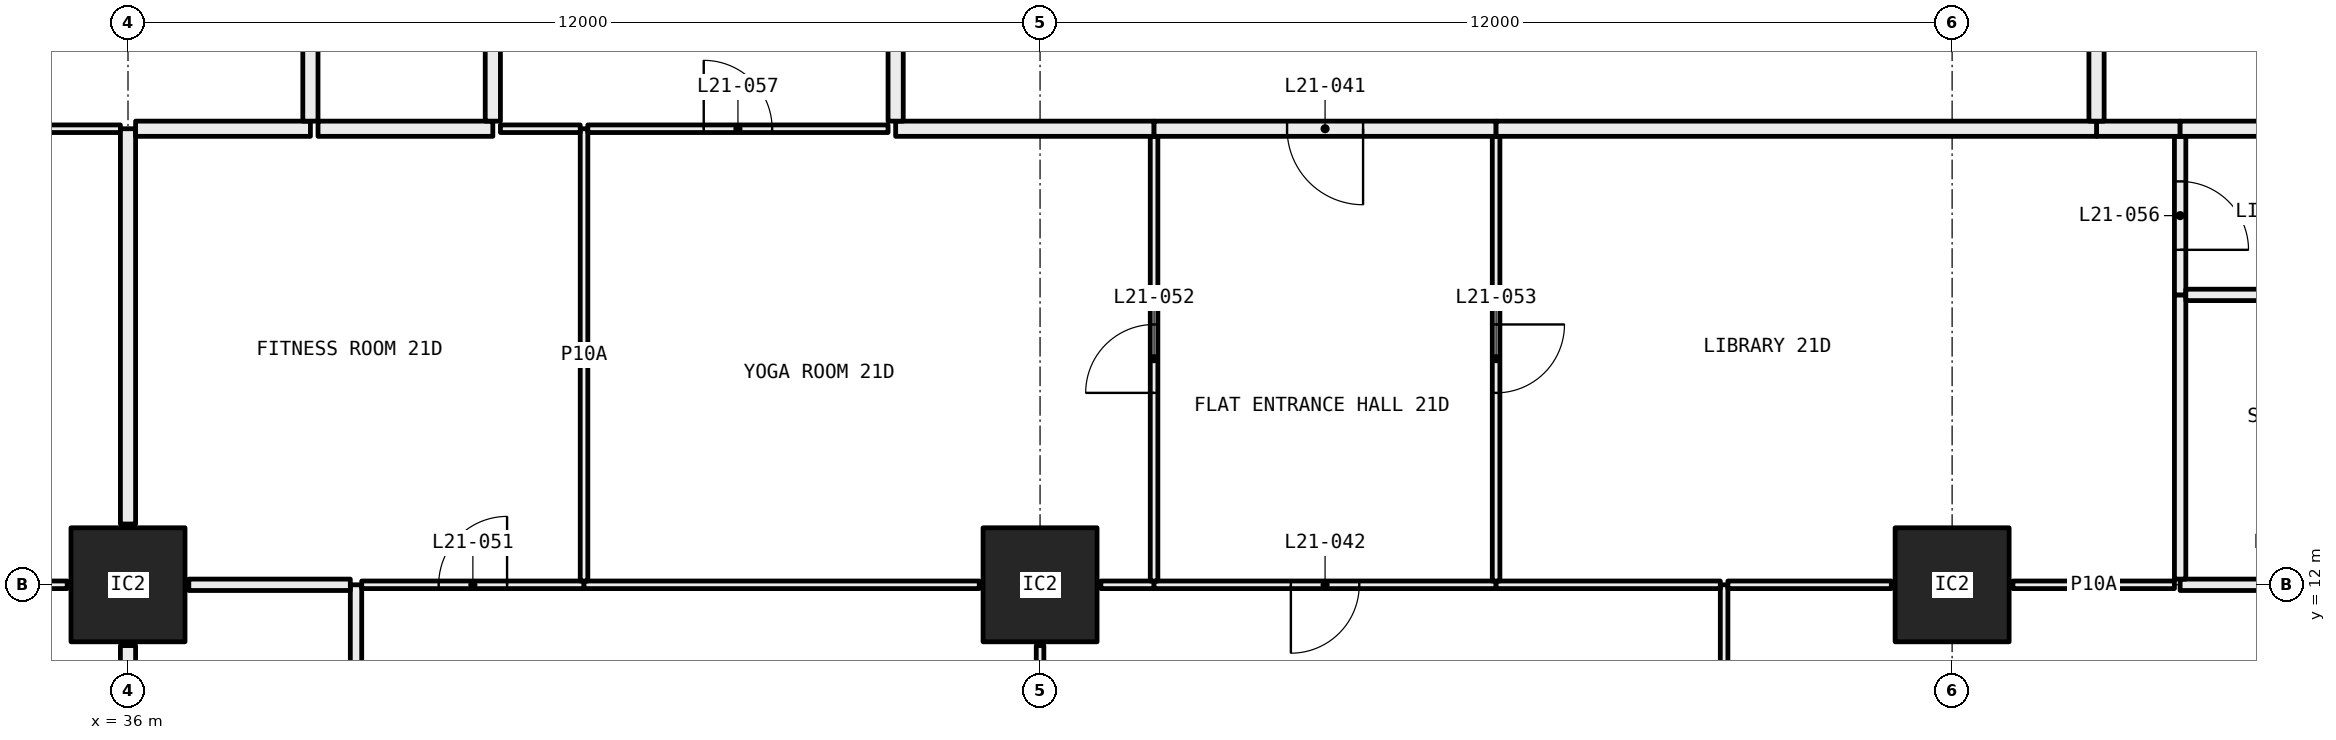
"""IFC4 building model, lengths in metres.
Left out: names, types, materials, properties, quantities, classifications, styles, units other than length and angle.
Written with IfcOpenShell. Run it as: python <this file> out.ifc"""

import sys

from ifc_helpers import new_model, si_unit, direction, frame, frame_2d, origin, origin_2d, place, context, subcontext, project, spatial, rectangle, hollow_rectangle, extrude, element, fill, save


model = new_model("IFC4")
c1 = context("Model", 3, precision=1e-05, world=origin(), true_north=direction((0.0, 1.0)))
c2 = subcontext(c1, "Body", "Model", "MODEL_VIEW")
j1 = project(units=[si_unit("LENGTHUNIT", "METRE"), si_unit("PLANEANGLEUNIT", "RADIAN")], contexts=[c1])
p1 = place(None, origin())
s1 = spatial("IfcSite", under=j1, at=p1, CompositionType="ELEMENT")
p2 = place(p1, origin())
s2 = spatial("IfcBuilding", under=s1, at=p2, CompositionType="ELEMENT")
p3 = place(p2, frame((0.0, 0.0, 85.2)))
s3 = spatial("IfcBuildingStorey", under=s2, at=p3, CompositionType="ELEMENT", Elevation=85.2)
for number, where, z_axis, x_axis in (
    (1, (36.0, 12.0, 0.0), (0.0, 0.0, 1.0), (1.0, 0.0, 0.0)),
    (2, (48.0, 12.0, 0.0), (0.0, 0.0, 1.0), (1.0, 0.0, 0.0)),
    (3, (60.0, 12.0, 0.0), (0.0, 0.0, 1.0), (1.0, 0.0, 0.0)),
):
    element("IfcColumn", number, at=place(p3, frame(where, z_axis=z_axis, x_axis=x_axis)), inside=s3, PredefinedType="COLUMN", context=c2, shape_type="SweptSolid", body=[
        extrude(hollow_rectangle(XDim=1.5, YDim=1.5, WallThickness=0.065, at=origin_2d()), origin(), (0.0, 0.0, 1.0), 3.05),
    ])
p4 = place(p3, frame((35.2, 12.0, 0.0), z_axis=(0.0, 0.0, 1.0), x_axis=(-1.0, 0.0, 0.0)))
e4 = element("IfcWall", 4, at=p4, inside=s3, PredefinedType="PARTITIONING", context=c2, shape_type="SweptSolid", body=[
    extrude(rectangle(XDim=2.15, YDim=0.1, at=frame_2d((1.075, 0.0))), origin(), (0.0, 0.0, 1.0), 2.45),
])
p5 = place(p3, frame((36.0, 6.0, 0.0), z_axis=(0.0, 0.0, 1.0), x_axis=(0.0, 1.0, 0.0)))
e5 = element("IfcWall", 5, at=p5, inside=s3, PredefinedType="PARTITIONING", context=c2, shape_type="SweptSolid", body=[
    extrude(rectangle(XDim=5.2, YDim=0.2, at=frame_2d((2.6, 0.0))), origin(), (0.0, 0.0, 1.0), 2.45),
])
p6 = place(p3, frame((35.9, 18.0, 0.0), z_axis=(0.0, 0.0, 1.0), x_axis=(-1.0, 0.0, 0.0)))
e6 = element("IfcWall", 6, at=p6, inside=s3, PredefinedType="PARTITIONING", context=c2, shape_type="SweptSolid", body=[
    extrude(rectangle(XDim=1.4, YDim=0.1, at=frame_2d((0.7, 0.0))), origin(), (0.0, 0.0, 1.0), 3.05),
])
p7 = place(p3, frame((36.0, 12.8, 0.0), z_axis=(0.0, 0.0, 1.0), x_axis=(0.0, 1.0, 0.0)))
e7 = element("IfcWall", 7, at=p7, inside=s3, PredefinedType="PARTITIONING", context=c2, shape_type="SweptSolid", body=[
    extrude(rectangle(XDim=5.2, YDim=0.2, at=frame_2d((2.6, 0.0))), origin(), (0.0, 0.0, 1.0), 2.45),
])
p8 = place(p3, frame((36.1, 18.0, 0.0), z_axis=(0.0, 0.0, 1.0), x_axis=(1.0, 0.0, 0.0)))
e8 = element("IfcWall", 8, at=p8, inside=s3, PredefinedType="PARTITIONING", context=c2, shape_type="SweptSolid", body=[
    extrude(rectangle(XDim=2.3, YDim=0.2, at=frame_2d((1.15, 0.0))), origin(), (0.0, 0.0, 1.0), 3.05),
])
p9 = place(p3, frame((38.4, 18.1, 0.0), z_axis=(0.0, 0.0, 1.0), x_axis=(0.0, 1.0, 0.0)))
e9 = element("IfcWall", 9, at=p9, inside=s3, PredefinedType="PARTITIONING", context=c2, shape_type="SweptSolid", body=[
    extrude(rectangle(XDim=6.2, YDim=0.2, at=frame_2d((3.1, 0.0))), origin(), (0.0, 0.0, 1.0), 2.45),
])
p10 = place(p3, frame((39.0, 6.075, 0.0), z_axis=(0.0, 0.0, 1.0), x_axis=(0.0, 1.0, 0.0)))
e10 = element("IfcWall", 10, at=p10, inside=s3, PredefinedType="PARTITIONING", context=c2, shape_type="SweptSolid", body=[
    extrude(rectangle(XDim=5.925, YDim=0.15, at=frame_2d((2.962, 0.0))), origin(), (0.0, 0.0, 1.0), 2.45),
])
p11 = place(p10, frame((2.512, 0.0, 0.0)))
e11 = element("IfcOpeningElement", 11, at=p11, cuts=e10, PredefinedType="OPENING", context=c2, shape_type="SweptSolid", body=[
    extrude(rectangle(XDim=0.9, YDim=2.1, at=frame_2d((0.45, 1.05))), frame((0.0, 0.085, 0.0), z_axis=(0.0, -1.0, 0.0), x_axis=(1.0, 0.0, 0.0)), (0.0, 0.0, 1.0), 0.17),
])
p12 = place(p3, frame((38.925, 12.0, 0.0), z_axis=(0.0, 0.0, 1.0), x_axis=(-1.0, 0.0, 0.0)))
e12 = element("IfcWall", 12, at=p12, inside=s3, PredefinedType="PARTITIONING", context=c2, shape_type="SweptSolid", body=[
    extrude(rectangle(XDim=2.125, YDim=0.15, at=frame_2d((1.062, 0.0))), origin(), (0.0, 0.0, 1.0), 2.45),
])
p13 = place(p3, frame((48.0, 6.05, 0.0), z_axis=(0.0, 0.0, 1.0), x_axis=(0.0, 1.0, 0.0)))
e13 = element("IfcWall", 13, at=p13, inside=s3, PredefinedType="PARTITIONING", context=c2, shape_type="SweptSolid", body=[
    extrude(rectangle(XDim=5.15, YDim=0.1, at=frame_2d((2.575, 0.0))), origin(), (0.0, 0.0, 1.0), 2.45),
])
p14 = place(p13, frame((2.125, 0.0, 0.0)))
e14 = element("IfcOpeningElement", 14, at=p14, cuts=e13, PredefinedType="OPENING", context=c2, shape_type="SweptSolid", body=[
    extrude(rectangle(XDim=0.9, YDim=2.1, at=frame_2d((0.45, 1.05))), frame((0.0, 0.06, 0.0), z_axis=(0.0, -1.0, 0.0), x_axis=(1.0, 0.0, 0.0)), (0.0, 0.0, 1.0), 0.12),
])
p15 = place(p3, frame((42.0, 12.0, 0.0), z_axis=(0.0, 0.0, 1.0), x_axis=(-1.0, 0.0, 0.0)))
e15 = element("IfcWall", 15, at=p15, inside=s3, PredefinedType="PARTITIONING", context=c2, shape_type="SweptSolid", body=[
    extrude(rectangle(XDim=2.925, YDim=0.1, at=frame_2d((1.462, 0.0))), origin(), (0.0, 0.0, 1.0), 2.45),
])
p16 = place(p15, frame((1.012, 0.0, 0.0)))
e16 = element("IfcOpeningElement", 16, at=p16, cuts=e15, PredefinedType="OPENING", context=c2, shape_type="SweptSolid", body=[
    extrude(rectangle(XDim=0.9, YDim=2.1, at=frame_2d((0.45, 1.05))), frame((0.0, 0.06, 0.0), z_axis=(0.0, -1.0, 0.0), x_axis=(1.0, 0.0, 0.0)), (0.0, 0.0, 1.0), 0.12),
])
p17 = place(p3, frame((47.2, 12.0, 0.0), z_axis=(0.0, 0.0, 1.0), x_axis=(-1.0, 0.0, 0.0)))
e17 = element("IfcWall", 17, at=p17, inside=s3, PredefinedType="PARTITIONING", context=c2, shape_type="SweptSolid", body=[
    extrude(rectangle(XDim=5.2, YDim=0.1, at=frame_2d((2.6, 0.0))), origin(), (0.0, 0.0, 1.0), 2.45),
])
p18 = place(p3, frame((57.0, 6.05, 0.0), z_axis=(0.0, 0.0, 1.0), x_axis=(0.0, 1.0, 0.0)))
e18 = element("IfcWall", 18, at=p18, inside=s3, PredefinedType="PARTITIONING", context=c2, shape_type="SweptSolid", body=[
    extrude(rectangle(XDim=5.95, YDim=0.1, at=frame_2d((2.975, 0.0))), origin(), (0.0, 0.0, 1.0), 2.45),
])
p19 = place(p18, frame((2.525, 0.0, 0.0)))
e19 = element("IfcOpeningElement", 19, at=p19, cuts=e18, PredefinedType="OPENING", context=c2, shape_type="SweptSolid", body=[
    extrude(rectangle(XDim=0.9, YDim=2.1, at=frame_2d((0.45, 1.05))), frame((0.0, 0.06, 0.0), z_axis=(0.0, -1.0, 0.0), x_axis=(1.0, 0.0, 0.0)), (0.0, 0.0, 1.0), 0.12),
])
p20 = place(p3, frame((49.5, 12.0, 0.0), z_axis=(0.0, 0.0, 1.0), x_axis=(-1.0, 0.0, 0.0)))
e20 = element("IfcWall", 20, at=p20, inside=s3, PredefinedType="PARTITIONING", context=c2, shape_type="SweptSolid", body=[
    extrude(rectangle(XDim=0.7, YDim=0.1, at=frame_2d((0.35, 0.0))), origin(), (0.0, 0.0, 1.0), 2.45),
])
p21 = place(p3, frame((54.0, 12.0, 0.0), z_axis=(0.0, 0.0, 1.0), x_axis=(-1.0, 0.0, 0.0)))
e21 = element("IfcWall", 21, at=p21, inside=s3, PredefinedType="PARTITIONING", context=c2, shape_type="SweptSolid", body=[
    extrude(rectangle(XDim=4.5, YDim=0.1, at=frame_2d((2.25, 0.0))), origin(), (0.0, 0.0, 1.0), 2.45),
])
p22 = place(p21, frame((1.8, 0.0, 0.0)))
e22 = element("IfcOpeningElement", 22, at=p22, cuts=e21, PredefinedType="OPENING", context=c2, shape_type="SweptSolid", body=[
    extrude(rectangle(XDim=0.9, YDim=2.1, at=frame_2d((0.45, 1.05))), frame((0.0, 0.06, 0.0), z_axis=(0.0, -1.0, 0.0), x_axis=(1.0, 0.0, 0.0)), (0.0, 0.0, 1.0), 0.12),
])
p23 = place(p3, frame((56.95, 12.0, 0.0), z_axis=(0.0, 0.0, 1.0), x_axis=(-1.0, 0.0, 0.0)))
e23 = element("IfcWall", 23, at=p23, inside=s3, PredefinedType="PARTITIONING", context=c2, shape_type="SweptSolid", body=[
    extrude(rectangle(XDim=2.95, YDim=0.1, at=frame_2d((1.475, 0.0))), origin(), (0.0, 0.0, 1.0), 2.45),
])
p24 = place(p3, frame((59.2, 12.0, 0.0), z_axis=(0.0, 0.0, 1.0), x_axis=(-1.0, 0.0, 0.0)))
e24 = element("IfcWall", 24, at=p24, inside=s3, PredefinedType="PARTITIONING", context=c2, shape_type="SweptSolid", body=[
    extrude(rectangle(XDim=2.15, YDim=0.1, at=frame_2d((1.075, 0.0))), origin(), (0.0, 0.0, 1.0), 2.45),
])
p25 = place(p3, frame((62.925, 12.0, 0.0), z_axis=(0.0, 0.0, 1.0), x_axis=(-1.0, 0.0, 0.0)))
e25 = element("IfcWall", 25, at=p25, inside=s3, PredefinedType="PARTITIONING", context=c2, shape_type="SweptSolid", body=[
    extrude(rectangle(XDim=2.125, YDim=0.1, at=frame_2d((1.062, 0.0))), origin(), (0.0, 0.0, 1.0), 2.45),
])
p26 = place(p3, frame((66.0, 12.0, 0.0), z_axis=(0.0, 0.0, 1.0), x_axis=(-1.0, 0.0, 0.0)))
e26 = element("IfcWall", 26, at=p26, inside=s3, PredefinedType="PARTITIONING", context=c2, shape_type="SweptSolid", body=[
    extrude(rectangle(XDim=3.0, YDim=0.15, at=frame_2d((1.5, 0.0))), origin(), (0.0, 0.0, 1.0), 2.45),
])
p27 = place(p26, frame((1.05, 0.0, 0.0)))
e27 = element("IfcOpeningElement", 27, at=p27, cuts=e26, PredefinedType="OPENING", context=c2, shape_type="SweptSolid", body=[
    extrude(rectangle(XDim=0.9, YDim=2.1, at=frame_2d((0.45, 1.05))), frame((0.0, 0.085, 0.0), z_axis=(0.0, -1.0, 0.0), x_axis=(1.0, 0.0, 0.0)), (0.0, 0.0, 1.0), 0.17),
])
p28 = place(p3, frame((42.0, 12.05, 0.0), z_axis=(0.0, 0.0, 1.0), x_axis=(0.0, 1.0, 0.0)))
e28 = element("IfcWall", 28, at=p28, inside=s3, PredefinedType="PARTITIONING", context=c2, shape_type="SweptSolid", body=[
    extrude(rectangle(XDim=5.95, YDim=0.1, at=frame_2d((2.975, 0.0))), origin(), (0.0, 0.0, 1.0), 2.45),
])
p29 = place(p3, frame((41.95, 18.0, 0.0), z_axis=(0.0, 0.0, 1.0), x_axis=(-1.0, 0.0, 0.0)))
e29 = element("IfcWall", 29, at=p29, inside=s3, PredefinedType="PARTITIONING", context=c2, shape_type="SweptSolid", body=[
    extrude(rectangle(XDim=1.05, YDim=0.1, at=frame_2d((0.525, 0.0))), origin(), (0.0, 0.0, 1.0), 3.05),
])
p30 = place(p3, frame((40.8, 18.0, 0.0), z_axis=(0.0, 0.0, 1.0), x_axis=(-1.0, 0.0, 0.0)))
e30 = element("IfcWall", 30, at=p30, inside=s3, PredefinedType="PARTITIONING", context=c2, shape_type="SweptSolid", body=[
    extrude(rectangle(XDim=2.3, YDim=0.2, at=frame_2d((1.15, 0.0))), origin(), (0.0, 0.0, 1.0), 3.05),
])
p31 = place(p3, frame((49.5, 12.05, 0.0), z_axis=(0.0, 0.0, 1.0), x_axis=(0.0, 1.0, 0.0)))
e31 = element("IfcWall", 31, at=p31, inside=s3, PredefinedType="PARTITIONING", context=c2, shape_type="SweptSolid", body=[
    extrude(rectangle(XDim=5.85, YDim=0.1, at=frame_2d((2.925, 0.0))), origin(), (0.0, 0.0, 1.0), 2.45),
])
p32 = place(p31, frame((2.475, 0.0, 0.0)))
e32 = element("IfcOpeningElement", 32, at=p32, cuts=e31, PredefinedType="OPENING", context=c2, shape_type="SweptSolid", body=[
    extrude(rectangle(XDim=0.9, YDim=2.1, at=frame_2d((0.45, 1.05))), frame((0.0, 0.06, 0.0), z_axis=(0.0, -1.0, 0.0), x_axis=(1.0, 0.0, 0.0)), (0.0, 0.0, 1.0), 0.12),
])
p33 = place(p3, frame((46.0, 18.0, 0.0), z_axis=(0.0, 0.0, 1.0), x_axis=(-1.0, 0.0, 0.0)))
e33 = element("IfcWall", 33, at=p33, inside=s3, PredefinedType="PARTITIONING", context=c2, shape_type="SweptSolid", body=[
    extrude(rectangle(XDim=3.95, YDim=0.1, at=frame_2d((1.975, 0.0))), origin(), (0.0, 0.0, 1.0), 3.05),
])
p34 = place(p33, frame((1.525, 0.0, 0.0)))
e34 = element("IfcOpeningElement", 34, at=p34, cuts=e33, PredefinedType="OPENING", context=c2, shape_type="SweptSolid", body=[
    extrude(rectangle(XDim=0.9, YDim=2.1, at=frame_2d((0.45, 1.05))), frame((0.0, 0.06, 0.0), z_axis=(0.0, -1.0, 0.0), x_axis=(1.0, 0.0, 0.0)), (0.0, 0.0, 1.0), 0.12),
])
p35 = place(p3, frame((49.5, 18.0, 0.0), z_axis=(0.0, 0.0, 1.0), x_axis=(-1.0, 0.0, 0.0)))
e35 = element("IfcWall", 35, at=p35, inside=s3, PredefinedType="PARTITIONING", context=c2, shape_type="SweptSolid", body=[
    extrude(rectangle(XDim=3.4, YDim=0.2, at=frame_2d((1.7, 0.0))), origin(), (0.0, 0.0, 1.0), 3.05),
])
p36 = place(p3, frame((54.0, 12.05, 0.0), z_axis=(0.0, 0.0, 1.0), x_axis=(0.0, 1.0, 0.0)))
e36 = element("IfcWall", 36, at=p36, inside=s3, PredefinedType="PARTITIONING", context=c2, shape_type="SweptSolid", body=[
    extrude(rectangle(XDim=5.85, YDim=0.1, at=frame_2d((2.925, 0.0))), origin(), (0.0, 0.0, 1.0), 2.45),
])
p37 = place(p36, frame((2.475, 0.0, 0.0)))
e37 = element("IfcOpeningElement", 37, at=p37, cuts=e36, PredefinedType="OPENING", context=c2, shape_type="SweptSolid", body=[
    extrude(rectangle(XDim=0.9, YDim=2.1, at=frame_2d((0.45, 1.05))), frame((0.0, 0.06, 0.0), z_axis=(0.0, -1.0, 0.0), x_axis=(1.0, 0.0, 0.0)), (0.0, 0.0, 1.0), 0.12),
])
p38 = place(p3, frame((54.0, 18.0, 0.0), z_axis=(0.0, 0.0, 1.0), x_axis=(-1.0, 0.0, 0.0)))
e38 = element("IfcWall", 38, at=p38, inside=s3, PredefinedType="PARTITIONING", context=c2, shape_type="SweptSolid", body=[
    extrude(rectangle(XDim=4.5, YDim=0.2, at=frame_2d((2.25, 0.0))), origin(), (0.0, 0.0, 1.0), 3.05),
])
p39 = place(p38, frame((1.75, 0.0, 0.0)))
e39 = element("IfcOpeningElement", 39, at=p39, cuts=e38, PredefinedType="OPENING", context=c2, shape_type="SweptSolid", body=[
    extrude(rectangle(XDim=1.0, YDim=2.1, at=frame_2d((0.5, 1.05))), frame((0.0, 0.11, 0.0), z_axis=(0.0, -1.0, 0.0), x_axis=(1.0, 0.0, 0.0)), (0.0, 0.0, 1.0), 0.22),
])
p40 = place(p3, frame((63.0, 12.075, 0.0), z_axis=(0.0, 0.0, 1.0), x_axis=(0.0, 1.0, 0.0)))
e40 = element("IfcWall", 40, at=p40, inside=s3, PredefinedType="PARTITIONING", context=c2, shape_type="SweptSolid", body=[
    extrude(rectangle(XDim=3.739, YDim=0.15, at=frame_2d((1.87, 0.0))), origin(), (0.0, 0.0, 1.0), 2.45),
])
p41 = place(p3, frame((63.0, 15.814, 0.0), z_axis=(0.0, 0.0, 1.0), x_axis=(0.0, 1.0, 0.0)))
e41 = element("IfcWall", 41, at=p41, inside=s3, PredefinedType="PARTITIONING", context=c2, shape_type="SweptSolid", body=[
    extrude(rectangle(XDim=2.086, YDim=0.15, at=frame_2d((1.043, 0.0))), origin(), (0.0, 0.0, 1.0), 3.05),
])
p42 = place(p41, frame((0.593, 0.0, 0.0)))
e42 = element("IfcOpeningElement", 42, at=p42, cuts=e41, PredefinedType="OPENING", context=c2, shape_type="SweptSolid", body=[
    extrude(rectangle(XDim=0.9, YDim=2.1, at=frame_2d((0.45, 1.05))), frame((0.0, 0.085, 0.0), z_axis=(0.0, -1.0, 0.0), x_axis=(1.0, 0.0, 0.0)), (0.0, 0.0, 1.0), 0.17),
])
p43 = place(p3, frame((63.0, 18.0, 0.0), z_axis=(0.0, 0.0, 1.0), x_axis=(-1.0, 0.0, 0.0)))
e43 = element("IfcWall", 43, at=p43, inside=s3, PredefinedType="PARTITIONING", context=c2, shape_type="SweptSolid", body=[
    extrude(rectangle(XDim=1.1, YDim=0.2, at=frame_2d((0.55, 0.0))), origin(), (0.0, 0.0, 1.0), 3.05),
])
p44 = place(p3, frame((61.9, 18.0, 0.0), z_axis=(0.0, 0.0, 1.0), x_axis=(-1.0, 0.0, 0.0)))
e44 = element("IfcWall", 44, at=p44, inside=s3, PredefinedType="PARTITIONING", context=c2, shape_type="SweptSolid", body=[
    extrude(rectangle(XDim=7.9, YDim=0.2, at=frame_2d((3.95, 0.0))), origin(), (0.0, 0.0, 1.0), 3.05),
])
p45 = place(p3, frame((66.071, 15.814, 0.0), z_axis=(0.0, 0.0, 1.0), x_axis=(-1.0, 0.0, 0.0)))
e45 = element("IfcWall", 45, at=p45, inside=s3, PredefinedType="PARTITIONING", context=c2, shape_type="SweptSolid", body=[
    extrude(rectangle(XDim=2.996, YDim=0.15, at=frame_2d((1.498, 0.0))), origin(), (0.0, 0.0, 1.0), 3.05),
])
p46 = place(p3, frame((66.0, 18.0, 0.0), z_axis=(0.0, 0.0, 1.0), x_axis=(-1.0, 0.0, 0.0)))
e46 = element("IfcWall", 46, at=p46, inside=s3, PredefinedType="PARTITIONING", context=c2, shape_type="SweptSolid", body=[
    extrude(rectangle(XDim=3.0, YDim=0.2, at=frame_2d((1.5, 0.0))), origin(), (0.0, 0.0, 1.0), 3.05),
])
p47 = place(p3, frame((40.8, 23.9, 0.0), z_axis=(0.0, 0.0, 1.0), x_axis=(0.0, -1.0, 0.0)))
e47 = element("IfcWall", 47, at=p47, inside=s3, PredefinedType="PARTITIONING", context=c2, shape_type="SweptSolid", body=[
    extrude(rectangle(XDim=5.8, YDim=0.2, at=frame_2d((2.9, 0.0))), origin(), (0.0, 0.0, 1.0), 3.05),
])
p48 = place(p3, frame((46.1, 18.1, 0.0), z_axis=(0.0, 0.0, 1.0), x_axis=(0.0, 1.0, 0.0)))
e48 = element("IfcWall", 48, at=p48, inside=s3, PredefinedType="PARTITIONING", context=c2, shape_type="SweptSolid", body=[
    extrude(rectangle(XDim=6.2, YDim=0.2, at=frame_2d((3.1, 0.0))), origin(), (0.0, 0.0, 1.0), 2.45),
])
p49 = place(p3, frame((61.9, 22.5, 0.0), z_axis=(0.0, 0.0, 1.0), x_axis=(0.0, -1.0, 0.0)))
e49 = element("IfcWall", 49, at=p49, inside=s3, PredefinedType="PARTITIONING", context=c2, shape_type="SweptSolid", body=[
    extrude(rectangle(XDim=4.4, YDim=0.2, at=frame_2d((2.2, 0.0))), origin(), (0.0, 0.0, 1.0), 3.05),
])
p50 = place(p39, origin())
e50 = element("IfcDoor", 50, at=p50, inside=s3, OperationType="SINGLE_SWING_RIGHT", PredefinedType="DOOR", context=c2, shape_type="SweptSolid", body=[
    extrude(rectangle(XDim=1.0, YDim=2.1, at=frame_2d((0.5, 1.05))), frame((0.0, 0.025, 0.0), z_axis=(0.0, -1.0, 0.0), x_axis=(1.0, 0.0, 0.0)), (0.0, 0.0, 1.0), 0.05),
])
fill(e39, e50)
p51 = place(p22, origin())
e51 = element("IfcDoor", 51, at=p51, inside=s3, OperationType="SINGLE_SWING_LEFT", PredefinedType="DOOR", context=c2, shape_type="SweptSolid", body=[
    extrude(rectangle(XDim=0.9, YDim=2.1, at=frame_2d((0.45, 1.05))), frame((0.0, 0.025, 0.0), z_axis=(0.0, -1.0, 0.0), x_axis=(1.0, 0.0, 0.0)), (0.0, 0.0, 1.0), 0.05),
])
fill(e22, e51)
p52 = place(p16, frame((0.9, 0.0, 0.0), x_axis=(-1.0, 0.0, 0.0)))
e52 = element("IfcDoor", 52, at=p52, inside=s3, OperationType="SINGLE_SWING_LEFT", PredefinedType="DOOR", context=c2, shape_type="SweptSolid", body=[
    extrude(rectangle(XDim=0.9, YDim=2.1, at=frame_2d((0.45, 1.05))), frame((0.0, 0.025, 0.0), z_axis=(0.0, -1.0, 0.0), x_axis=(1.0, 0.0, 0.0)), (0.0, 0.0, 1.0), 0.05),
])
fill(e16, e52)
p53 = place(p32, origin())
e53 = element("IfcDoor", 53, at=p53, inside=s3, OperationType="SINGLE_SWING_RIGHT", PredefinedType="DOOR", context=c2, shape_type="SweptSolid", body=[
    extrude(rectangle(XDim=0.9, YDim=2.1, at=frame_2d((0.45, 1.05))), frame((0.0, 0.025, 0.0), z_axis=(0.0, -1.0, 0.0), x_axis=(1.0, 0.0, 0.0)), (0.0, 0.0, 1.0), 0.05),
])
fill(e32, e53)
p54 = place(p37, frame((0.9, 0.0, 0.0), x_axis=(-1.0, 0.0, 0.0)))
e54 = element("IfcDoor", 54, at=p54, inside=s3, OperationType="SINGLE_SWING_RIGHT", PredefinedType="DOOR", context=c2, shape_type="SweptSolid", body=[
    extrude(rectangle(XDim=0.9, YDim=2.1, at=frame_2d((0.45, 1.05))), frame((0.0, 0.025, 0.0), z_axis=(0.0, -1.0, 0.0), x_axis=(1.0, 0.0, 0.0)), (0.0, 0.0, 1.0), 0.05),
])
fill(e37, e54)
p55 = place(p42, frame((0.9, 0.0, 0.0), x_axis=(-1.0, 0.0, 0.0)))
e55 = element("IfcDoor", 55, at=p55, inside=s3, OperationType="SINGLE_SWING_LEFT", PredefinedType="DOOR", context=c2, shape_type="SweptSolid", body=[
    extrude(rectangle(XDim=0.9, YDim=2.1, at=frame_2d((0.45, 1.05))), frame((0.0, 0.025, 0.0), z_axis=(0.0, -1.0, 0.0), x_axis=(1.0, 0.0, 0.0)), (0.0, 0.0, 1.0), 0.05),
])
fill(e42, e55)
p56 = place(p34, frame((0.9, 0.0, 0.0), x_axis=(-1.0, 0.0, 0.0)))
e56 = element("IfcDoor", 56, at=p56, inside=s3, OperationType="SINGLE_SWING_RIGHT", PredefinedType="DOOR", context=c2, shape_type="SweptSolid", body=[
    extrude(rectangle(XDim=0.9, YDim=2.1, at=frame_2d((0.45, 1.05))), frame((0.0, 0.025, 0.0), z_axis=(0.0, -1.0, 0.0), x_axis=(1.0, 0.0, 0.0)), (0.0, 0.0, 1.0), 0.05),
])
fill(e34, e56)
save(model, sys.argv[1])
